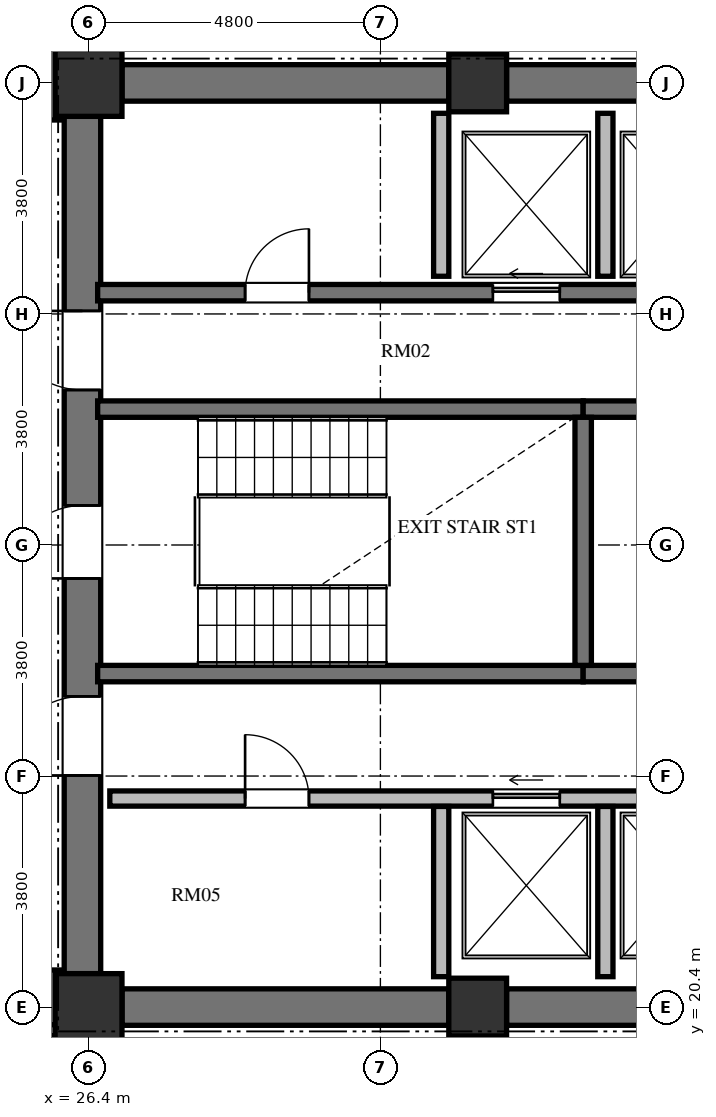
"""IFC4 building model, lengths in metres.
Left out: names, types, materials, properties, quantities, classifications, styles, units other than length and angle.
Written with IfcOpenShell. Run it as: python <this file> out.ifc"""

import sys

from ifc_helpers import new_model, si_unit, direction, frame, frame_2d, origin, origin_2d, place, context, subcontext, project, spatial, rectangle, extrude, element, fill, save


model = new_model("IFC4")
c1 = context("Model", 3, precision=1e-05, world=origin(), true_north=direction((0.0, 1.0)))
c2 = subcontext(c1, "Body", "Model", "MODEL_VIEW")
j1 = project(units=[si_unit("LENGTHUNIT", "METRE"), si_unit("PLANEANGLEUNIT", "RADIAN")], contexts=[c1])
p1 = place(None, origin())
s1 = spatial("IfcSite", under=j1, at=p1, CompositionType="ELEMENT")
p2 = place(p1, origin())
s2 = spatial("IfcBuilding", under=s1, at=p2, CompositionType="ELEMENT")
p3 = place(p2, frame((0.0, 0.0, 145.584)))
s3 = spatial("IfcBuildingStorey", under=s2, at=p3, CompositionType="ELEMENT", Elevation=145.584)
p4 = place(p3, frame((26.4, 20.4, 0.0), z_axis=(0.0, 0.0, 1.0), x_axis=(1.0, 0.0, 0.0)))
e1 = element("IfcColumn", 1, at=p4, inside=s3, PredefinedType="COLUMN", context=c2, shape_type="SweptSolid", body=[
    extrude(rectangle(XDim=1.1, YDim=1.1, at=origin_2d()), origin(), (0.0, 0.0, 1.0), 3.648),
])
for number, where, z_axis, x_axis in (
    (2, (32.8, 20.4, 0.0), (0.0, 0.0, 1.0), (1.0, 0.0, 0.0)),
    (3, (32.8, 35.6, 0.0), (0.0, 0.0, 1.0), (1.0, 0.0, 0.0)),
):
    element("IfcColumn", number, at=place(p3, frame(where, z_axis=z_axis, x_axis=x_axis)), inside=s3, PredefinedType="COLUMN", context=c2, shape_type="SweptSolid", body=[
        extrude(rectangle(XDim=0.95, YDim=0.95, at=origin_2d()), origin(), (0.0, 0.0, 1.0), 3.648),
    ])
p5 = place(p3, frame((26.4, 35.6, 0.0), z_axis=(0.0, 0.0, 1.0), x_axis=(1.0, 0.0, 0.0)))
e4 = element("IfcColumn", 4, at=p5, inside=s3, PredefinedType="COLUMN", context=c2, shape_type="SweptSolid", body=[
    extrude(rectangle(XDim=1.1, YDim=1.1, at=origin_2d()), origin(), (0.0, 0.0, 1.0), 3.648),
])
p6 = place(p3, frame((26.3, 20.95, 0.0), z_axis=(0.0, 0.0, 1.0), x_axis=(0.0, 1.0, 0.0)))
e5 = element("IfcWall", 5, at=p6, inside=s3, PredefinedType="SHEAR", context=c2, shape_type="SweptSolid", body=[
    extrude(rectangle(XDim=14.1, YDim=0.6, at=frame_2d((7.05, 0.0))), origin(), (0.0, 0.0, 1.0), 3.648),
])
p7 = place(p6, frame((6.5, 0.0, 0.0)))
e6 = element("IfcOpeningElement", 6, at=p7, cuts=e5, PredefinedType="OPENING", context=c2, shape_type="SweptSolid", body=[
    extrude(rectangle(XDim=1.2, YDim=2.15, at=frame_2d((0.6, 1.075))), frame((0.0, 0.31, 0.0), z_axis=(0.0, -1.0, 0.0), x_axis=(1.0, 0.0, 0.0)), (0.0, 0.0, 1.0), 0.62),
])
p8 = place(p6, frame((9.6, 0.0, 0.0)))
e7 = element("IfcOpeningElement", 7, at=p8, cuts=e5, PredefinedType="OPENING", context=c2, shape_type="SweptSolid", body=[
    extrude(rectangle(XDim=1.3, YDim=2.2, at=frame_2d((0.65, 1.1))), frame((0.0, 0.31, 0.0), z_axis=(0.0, -1.0, 0.0), x_axis=(1.0, 0.0, 0.0)), (0.0, 0.0, 1.0), 0.62),
])
p9 = place(p6, frame((3.26, 0.0, 0.0)))
e8 = element("IfcOpeningElement", 8, at=p9, cuts=e5, PredefinedType="OPENING", context=c2, shape_type="SweptSolid", body=[
    extrude(rectangle(XDim=1.3, YDim=2.2, at=frame_2d((0.65, 1.1))), frame((0.0, 0.31, 0.0), z_axis=(0.0, -1.0, 0.0), x_axis=(1.0, 0.0, 0.0)), (0.0, 0.0, 1.0), 0.62),
])
for number, where, z_axis, x_axis in (
    (9, (26.95, 20.4, 0.0), (0.0, 0.0, 1.0), (1.0, 0.0, 0.0)),
    (10, (26.95, 35.6, 0.0), (0.0, 0.0, 1.0), (1.0, 0.0, 0.0)),
):
    element("IfcWall", number, at=place(p3, frame(where, z_axis=z_axis, x_axis=x_axis)), inside=s3, PredefinedType="SHEAR", context=c2, shape_type="SweptSolid", body=[
        extrude(rectangle(XDim=5.375, YDim=0.6, at=frame_2d((2.688, 0.0))), origin(), (0.0, 0.0, 1.0), 3.648),
    ])
for number, where, z_axis, x_axis in (
    (11, (33.275, 20.4, 0.0), (0.0, 0.0, 1.0), (1.0, 0.0, 0.0)),
    (12, (33.275, 35.6, 0.0), (0.0, 0.0, 1.0), (1.0, 0.0, 0.0)),
):
    element("IfcWall", number, at=place(p3, frame(where, z_axis=z_axis, x_axis=x_axis)), inside=s3, PredefinedType="SHEAR", context=c2, shape_type="SweptSolid", body=[
        extrude(rectangle(XDim=5.45, YDim=0.6, at=frame_2d((2.725, 0.0))), origin(), (0.0, 0.0, 1.0), 3.648),
    ])
p10 = place(p3, frame((26.55, 30.235, 0.0), z_axis=(0.0, 0.0, 1.0), x_axis=(1.0, 0.0, 0.0)))
e13 = element("IfcWall", 13, at=p10, inside=s3, PredefinedType="SHEAR", context=c2, shape_type="SweptSolid", body=[
    extrude(rectangle(XDim=7.985, YDim=0.27, at=frame_2d((3.992, 0.0))), origin(), (0.0, 0.0, 1.0), 3.648),
])
p11 = place(p3, frame((34.535, 30.235, 0.0), z_axis=(0.0, 0.0, 1.0), x_axis=(1.0, 0.0, 0.0)))
e14 = element("IfcWall", 14, at=p11, inside=s3, PredefinedType="SHEAR", context=c2, shape_type="SweptSolid", body=[
    extrude(rectangle(XDim=2.93, YDim=0.27, at=frame_2d((1.465, 0.0))), origin(), (0.0, 0.0, 1.0), 3.648),
])
p12 = place(p11, frame((0.965, 0.0, 0.0)))
e15 = element("IfcOpeningElement", 15, at=p12, cuts=e14, PredefinedType="OPENING", context=c2, shape_type="SweptSolid", body=[
    extrude(rectangle(XDim=1.0, YDim=2.1, at=frame_2d((0.5, 1.05))), frame((0.0, 0.145, 0.0), z_axis=(0.0, -1.0, 0.0), x_axis=(1.0, 0.0, 0.0)), (0.0, 0.0, 1.0), 0.29),
])
p13 = place(p3, frame((26.55, 25.885, 0.0), z_axis=(0.0, 0.0, 1.0), x_axis=(1.0, 0.0, 0.0)))
e16 = element("IfcWall", 16, at=p13, inside=s3, PredefinedType="SHEAR", context=c2, shape_type="SweptSolid", body=[
    extrude(rectangle(XDim=7.985, YDim=0.27, at=frame_2d((3.992, 0.0))), origin(), (0.0, 0.0, 1.0), 3.648),
])
p14 = place(p3, frame((34.535, 25.885, 0.0), z_axis=(0.0, 0.0, 1.0), x_axis=(1.0, 0.0, 0.0)))
e17 = element("IfcWall", 17, at=p14, inside=s3, PredefinedType="SHEAR", context=c2, shape_type="SweptSolid", body=[
    extrude(rectangle(XDim=2.93, YDim=0.27, at=frame_2d((1.465, 0.0))), origin(), (0.0, 0.0, 1.0), 3.648),
])
p15 = place(p3, frame((34.535, 26.02, 0.0), z_axis=(0.0, 0.0, 1.0), x_axis=(0.0, 1.0, 0.0)))
e18 = element("IfcWall", 18, at=p15, inside=s3, PredefinedType="SHEAR", context=c2, shape_type="SweptSolid", body=[
    extrude(rectangle(XDim=4.08, YDim=0.27, at=frame_2d((2.04, 0.0))), origin(), (0.0, 0.0, 1.0), 3.648),
])
p16 = place(p3, frame((26.55, 32.15, 0.0), z_axis=(0.0, 0.0, 1.0), x_axis=(1.0, 0.0, 0.0)))
e19 = element("IfcWall", 19, at=p16, inside=s3, PredefinedType="SHEAR", context=c2, shape_type="SweptSolid", body=[
    extrude(rectangle(XDim=16.4, YDim=0.27, at=frame_2d((8.2, 0.0))), origin(), (0.0, 0.0, 1.0), 3.648),
])
p17 = place(p16, frame((2.425, 0.0, 0.0)))
e20 = element("IfcOpeningElement", 20, at=p17, cuts=e19, PredefinedType="OPENING", context=c2, shape_type="SweptSolid", body=[
    extrude(rectangle(XDim=1.05, YDim=2.15, at=frame_2d((0.525, 1.075))), frame((0.0, 0.145, 0.0), z_axis=(0.0, -1.0, 0.0), x_axis=(1.0, 0.0, 0.0)), (0.0, 0.0, 1.0), 0.29),
])
p18 = place(p16, frame((6.5, 0.0, 0.0)))
e21 = element("IfcOpeningElement", 21, at=p18, cuts=e19, PredefinedType="OPENING", context=c2, shape_type="SweptSolid", body=[
    extrude(rectangle(XDim=1.1, YDim=2.2, at=frame_2d((0.55, 1.1))), frame((0.0, 0.145, 0.0), z_axis=(0.0, -1.0, 0.0), x_axis=(1.0, 0.0, 0.0)), (0.0, 0.0, 1.0), 0.29),
])
p19 = place(p16, frame((9.1, 0.0, 0.0)))
e22 = element("IfcOpeningElement", 22, at=p19, cuts=e19, PredefinedType="OPENING", context=c2, shape_type="SweptSolid", body=[
    extrude(rectangle(XDim=1.1, YDim=2.2, at=frame_2d((0.55, 1.1))), frame((0.0, 0.145, 0.0), z_axis=(0.0, -1.0, 0.0), x_axis=(1.0, 0.0, 0.0)), (0.0, 0.0, 1.0), 0.29),
])
p20 = place(p16, frame((11.9, 0.0, 0.0)))
e23 = element("IfcOpeningElement", 23, at=p20, cuts=e19, PredefinedType="OPENING", context=c2, shape_type="SweptSolid", body=[
    extrude(rectangle(XDim=1.1, YDim=2.2, at=frame_2d((0.55, 1.1))), frame((0.0, 0.145, 0.0), z_axis=(0.0, -1.0, 0.0), x_axis=(1.0, 0.0, 0.0)), (0.0, 0.0, 1.0), 0.29),
])
p21 = place(p16, frame((14.5, 0.0, 0.0)))
e24 = element("IfcOpeningElement", 24, at=p21, cuts=e19, PredefinedType="OPENING", context=c2, shape_type="SweptSolid", body=[
    extrude(rectangle(XDim=1.1, YDim=2.2, at=frame_2d((0.55, 1.1))), frame((0.0, 0.145, 0.0), z_axis=(0.0, -1.0, 0.0), x_axis=(1.0, 0.0, 0.0)), (0.0, 0.0, 1.0), 0.29),
])
p22 = place(p3, frame((26.75, 23.83, 0.0), z_axis=(0.0, 0.0, 1.0), x_axis=(1.0, 0.0, 0.0)))
e25 = element("IfcWall", 25, at=p22, inside=s3, PredefinedType="SOLIDWALL", context=c2, shape_type="SweptSolid", body=[
    extrude(rectangle(XDim=16.2, YDim=0.25, at=frame_2d((8.1, 0.0))), origin(), (0.0, 0.0, 1.0), 3.428),
])
p23 = place(p22, frame((2.225, 0.0, 0.0)))
e26 = element("IfcOpeningElement", 26, at=p23, cuts=e25, PredefinedType="OPENING", context=c2, shape_type="SweptSolid", body=[
    extrude(rectangle(XDim=1.05, YDim=2.15, at=frame_2d((0.525, 1.075))), frame((0.0, 0.135, 0.0), z_axis=(0.0, -1.0, 0.0), x_axis=(1.0, 0.0, 0.0)), (0.0, 0.0, 1.0), 0.27),
])
p24 = place(p22, frame((6.3, 0.0, 0.0)))
e27 = element("IfcOpeningElement", 27, at=p24, cuts=e25, PredefinedType="OPENING", context=c2, shape_type="SweptSolid", body=[
    extrude(rectangle(XDim=1.1, YDim=2.2, at=frame_2d((0.55, 1.1))), frame((0.0, 0.135, 0.0), z_axis=(0.0, -1.0, 0.0), x_axis=(1.0, 0.0, 0.0)), (0.0, 0.0, 1.0), 0.27),
])
p25 = place(p22, frame((8.9, 0.0, 0.0)))
e28 = element("IfcOpeningElement", 28, at=p25, cuts=e25, PredefinedType="OPENING", context=c2, shape_type="SweptSolid", body=[
    extrude(rectangle(XDim=1.1, YDim=2.2, at=frame_2d((0.55, 1.1))), frame((0.0, 0.135, 0.0), z_axis=(0.0, -1.0, 0.0), x_axis=(1.0, 0.0, 0.0)), (0.0, 0.0, 1.0), 0.27),
])
p26 = place(p22, frame((11.7, 0.0, 0.0)))
e29 = element("IfcOpeningElement", 29, at=p26, cuts=e25, PredefinedType="OPENING", context=c2, shape_type="SweptSolid", body=[
    extrude(rectangle(XDim=1.1, YDim=2.2, at=frame_2d((0.55, 1.1))), frame((0.0, 0.135, 0.0), z_axis=(0.0, -1.0, 0.0), x_axis=(1.0, 0.0, 0.0)), (0.0, 0.0, 1.0), 0.27),
])
p27 = place(p22, frame((14.15, 0.0, 0.0)))
e30 = element("IfcOpeningElement", 30, at=p27, cuts=e25, PredefinedType="OPENING", context=c2, shape_type="SweptSolid", body=[
    extrude(rectangle(XDim=1.4, YDim=2.3, at=frame_2d((0.7, 1.15))), frame((0.0, 0.135, 0.0), z_axis=(0.0, -1.0, 0.0), x_axis=(1.0, 0.0, 0.0)), (0.0, 0.0, 1.0), 0.27),
])
p28 = place(p3, frame((32.2, 32.42, 0.0), z_axis=(0.0, 0.0, 1.0), x_axis=(0.0, 1.0, 0.0)))
e31 = element("IfcWall", 31, at=p28, inside=s3, PredefinedType="SOLIDWALL", context=c2, shape_type="SweptSolid", body=[
    extrude(rectangle(XDim=2.68, YDim=0.25, at=frame_2d((1.34, 0.0))), origin(), (0.0, 0.0, 1.0), 3.428),
])
p29 = place(p3, frame((32.2, 20.9, 0.0), z_axis=(0.0, 0.0, 1.0), x_axis=(0.0, 1.0, 0.0)))
e32 = element("IfcWall", 32, at=p29, inside=s3, PredefinedType="SOLIDWALL", context=c2, shape_type="SweptSolid", body=[
    extrude(rectangle(XDim=2.8, YDim=0.25, at=frame_2d((1.4, 0.0))), origin(), (0.0, 0.0, 1.0), 3.428),
])
p30 = place(p3, frame((34.9, 32.42, 0.0), z_axis=(0.0, 0.0, 1.0), x_axis=(0.0, 1.0, 0.0)))
e33 = element("IfcWall", 33, at=p30, inside=s3, PredefinedType="SOLIDWALL", context=c2, shape_type="SweptSolid", body=[
    extrude(rectangle(XDim=2.68, YDim=0.25, at=frame_2d((1.34, 0.0))), origin(), (0.0, 0.0, 1.0), 3.428),
])
p31 = place(p3, frame((34.9, 20.9, 0.0), z_axis=(0.0, 0.0, 1.0), x_axis=(0.0, 1.0, 0.0)))
e34 = element("IfcWall", 34, at=p31, inside=s3, PredefinedType="SOLIDWALL", context=c2, shape_type="SweptSolid", body=[
    extrude(rectangle(XDim=2.8, YDim=0.25, at=frame_2d((1.4, 0.0))), origin(), (0.0, 0.0, 1.0), 3.428),
])
p32 = place(p3, frame((25.83, 36.21, 0.0), z_axis=(0.0, 0.0, 1.0), x_axis=(0.0, -1.0, 0.0)))
e35 = element("IfcWall", 35, at=p32, inside=s3, PredefinedType="PARTITIONING", context=c2, shape_type="SweptSolid", body=[
    extrude(rectangle(XDim=1.22, YDim=0.18, at=frame_2d((0.61, 0.0))), origin(), (0.0, 0.0, 1.0), 3.428),
])
p33 = place(p3, frame((25.83, 21.01, 0.0), z_axis=(0.0, 0.0, 1.0), x_axis=(0.0, -1.0, 0.0)))
e36 = element("IfcWall", 36, at=p33, inside=s3, PredefinedType="PARTITIONING", context=c2, shape_type="SweptSolid", body=[
    extrude(rectangle(XDim=1.03, YDim=0.18, at=frame_2d((0.515, 0.0))), origin(), (0.0, 0.0, 1.0), 3.428),
])
p34 = place(p3, frame((25.87, 20.02, 0.0), z_axis=(0.0, 0.0, 1.0), x_axis=(-1.0, 0.0, 0.0)))
e37 = element("IfcWall", 37, at=p34, inside=s3, PredefinedType="PARTITIONING", context=c2, shape_type="SweptSolid", body=[
    extrude(rectangle(XDim=2.56, YDim=0.18, at=frame_2d((1.28, 0.0))), origin(), (0.0, 0.0, 1.0), 3.428),
])
p35 = place(p7, origin())
e38 = element("IfcDoor", 38, at=p35, inside=s3, OperationType="SINGLE_SWING_LEFT", PredefinedType="DOOR", context=c2, shape_type="SweptSolid", body=[
    extrude(rectangle(XDim=1.2, YDim=2.15, at=frame_2d((0.6, 1.075))), frame((0.0, 0.025, 0.0), z_axis=(0.0, -1.0, 0.0), x_axis=(1.0, 0.0, 0.0)), (0.0, 0.0, 1.0), 0.05),
])
fill(e6, e38)
p36 = place(p8, origin())
e39 = element("IfcDoor", 39, at=p36, inside=s3, OperationType="SINGLE_SWING_RIGHT", PredefinedType="DOOR", context=c2, shape_type="SweptSolid", body=[
    extrude(rectangle(XDim=1.3, YDim=2.2, at=frame_2d((0.65, 1.1))), frame((0.0, 0.025, 0.0), z_axis=(0.0, -1.0, 0.0), x_axis=(1.0, 0.0, 0.0)), (0.0, 0.0, 1.0), 0.05),
])
fill(e7, e39)
p37 = place(p9, origin())
e40 = element("IfcDoor", 40, at=p37, inside=s3, OperationType="SINGLE_SWING_LEFT", PredefinedType="DOOR", context=c2, shape_type="SweptSolid", body=[
    extrude(rectangle(XDim=1.3, YDim=2.2, at=frame_2d((0.65, 1.1))), frame((0.0, 0.025, 0.0), z_axis=(0.0, -1.0, 0.0), x_axis=(1.0, 0.0, 0.0)), (0.0, 0.0, 1.0), 0.05),
])
fill(e8, e40)
p38 = place(p17, origin())
e41 = element("IfcDoor", 41, at=p38, inside=s3, OperationType="SINGLE_SWING_RIGHT", PredefinedType="DOOR", context=c2, shape_type="SweptSolid", body=[
    extrude(rectangle(XDim=1.05, YDim=2.15, at=frame_2d((0.525, 1.075))), frame((0.0, 0.025, 0.0), z_axis=(0.0, -1.0, 0.0), x_axis=(1.0, 0.0, 0.0)), (0.0, 0.0, 1.0), 0.05),
])
fill(e20, e41)
p39 = place(p23, origin())
e42 = element("IfcDoor", 42, at=p39, inside=s3, OperationType="SINGLE_SWING_LEFT", PredefinedType="DOOR", context=c2, shape_type="SweptSolid", body=[
    extrude(rectangle(XDim=1.05, YDim=2.15, at=frame_2d((0.525, 1.075))), frame((0.0, 0.025, 0.0), z_axis=(0.0, -1.0, 0.0), x_axis=(1.0, 0.0, 0.0)), (0.0, 0.0, 1.0), 0.05),
])
fill(e26, e42)
p40 = place(p18, origin())
e43 = element("IfcDoor", 43, at=p40, inside=s3, OperationType="SLIDING_TO_LEFT", PredefinedType="DOOR", context=c2, shape_type="SweptSolid", body=[
    extrude(rectangle(XDim=1.1, YDim=2.2, at=frame_2d((0.55, 1.1))), frame((0.0, 0.025, 0.0), z_axis=(0.0, -1.0, 0.0), x_axis=(1.0, 0.0, 0.0)), (0.0, 0.0, 1.0), 0.05),
])
fill(e21, e43)
p41 = place(p24, origin())
e44 = element("IfcDoor", 44, at=p41, inside=s3, OperationType="SLIDING_TO_LEFT", PredefinedType="DOOR", context=c2, shape_type="SweptSolid", body=[
    extrude(rectangle(XDim=1.1, YDim=2.2, at=frame_2d((0.55, 1.1))), frame((0.0, 0.025, 0.0), z_axis=(0.0, -1.0, 0.0), x_axis=(1.0, 0.0, 0.0)), (0.0, 0.0, 1.0), 0.05),
])
fill(e27, e44)
save(model, sys.argv[1])
